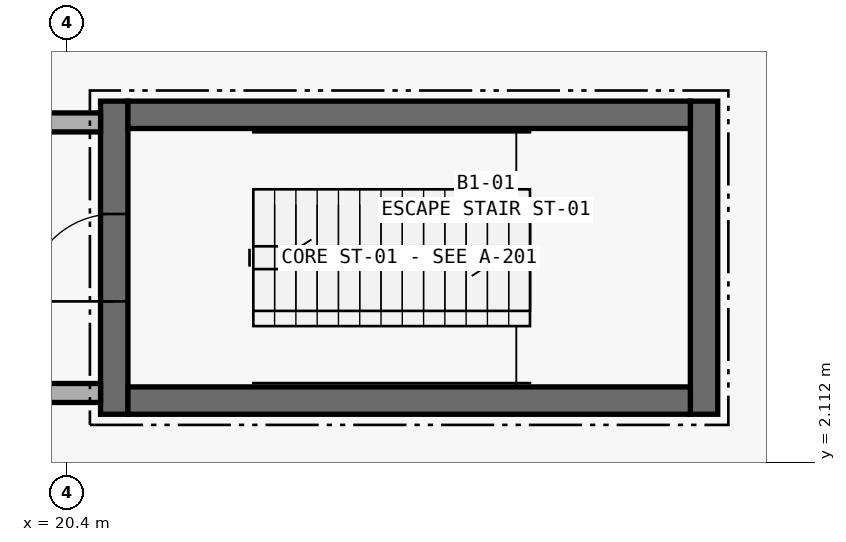
"""IFC4 building model, lengths in metres.
Left out: names, types, materials, properties, quantities, classifications, styles, units other than length and angle.
Written with IfcOpenShell. Run it as: python <this file> out.ifc"""

import sys

from ifc_helpers import new_model, si_unit, direction, frame, frame_2d, origin, place, context, subcontext, project, spatial, rectangle, extrude, element, fill, save


model = new_model("IFC4")
c1 = context("Model", 3, precision=1e-05, world=origin(), true_north=direction((0.0, 1.0)))
c2 = subcontext(c1, "Body", "Model", "MODEL_VIEW")
j1 = project(units=[si_unit("LENGTHUNIT", "METRE"), si_unit("PLANEANGLEUNIT", "RADIAN")], contexts=[c1])
p1 = place(None, origin())
s1 = spatial("IfcSite", under=j1, at=p1, CompositionType="ELEMENT")
p2 = place(p1, origin())
s2 = spatial("IfcBuilding", under=s1, at=p2, CompositionType="ELEMENT")
p3 = place(p2, frame((0.0, 0.0, -4.8)))
s3 = spatial("IfcBuildingStorey", under=s2, at=p3, CompositionType="ELEMENT", Elevation=-4.8)
p4 = place(p3, frame((21.02, 2.74, 0.0), z_axis=(0.0, 0.0, 1.0), x_axis=(0.0, 1.0, 0.0)))
e1 = element("IfcWall", 1, at=p4, inside=s3, PredefinedType="SHEAR", context=c2, shape_type="SweptSolid", body=[
    extrude(rectangle(XDim=4.12, YDim=0.36, at=frame_2d((2.06, 0.0))), origin(), (0.0, 0.0, 1.0), 4.38),
])
p5 = place(p4, frame((1.485, 0.0, 0.0)))
e2 = element("IfcOpeningElement", 2, at=p5, cuts=e1, PredefinedType="OPENING", context=c2, shape_type="SweptSolid", body=[
    extrude(rectangle(XDim=1.15, YDim=2.15, at=frame_2d((0.575, 1.075))), frame((0.0, 0.195, 0.0), z_axis=(0.0, -1.0, 0.0), x_axis=(1.0, 0.0, 0.0)), (0.0, 0.0, 1.0), 0.39),
])
p6 = place(p3, frame((28.78, 2.74, 0.0), z_axis=(0.0, 0.0, 1.0), x_axis=(0.0, 1.0, 0.0)))
e3 = element("IfcWall", 3, at=p6, inside=s3, PredefinedType="SHEAR", context=c2, shape_type="SweptSolid", body=[
    extrude(rectangle(XDim=4.12, YDim=0.36, at=frame_2d((2.06, 0.0))), origin(), (0.0, 0.0, 1.0), 4.38),
])
for number, where, z_axis, x_axis in (
    (4, (21.2, 6.68, 0.0), (0.0, 0.0, 1.0), (1.0, 0.0, 0.0)),
    (5, (21.2, 2.92, 0.0), (0.0, 0.0, 1.0), (1.0, 0.0, 0.0)),
):
    element("IfcWall", number, at=place(p3, frame(where, z_axis=z_axis, x_axis=x_axis)), inside=s3, PredefinedType="SHEAR", context=c2, shape_type="SweptSolid", body=[
        extrude(rectangle(XDim=7.4, YDim=0.36, at=frame_2d((3.7, 0.0))), origin(), (0.0, 0.0, 1.0), 4.38),
    ])
p7 = place(p3, frame((16.795, 3.02, 0.0), z_axis=(0.0, 0.0, 1.0), x_axis=(1.0, 0.0, 0.0)))
e6 = element("IfcWall", 6, at=p7, inside=s3, PredefinedType="PARTITIONING", context=c2, shape_type="SweptSolid", body=[
    extrude(rectangle(XDim=4.045, YDim=0.25, at=frame_2d((2.022, 0.0))), origin(), (0.0, 0.0, 1.0), 3.26),
])
p8 = place(p3, frame((19.655, 6.58, 0.0), z_axis=(0.0, 0.0, 1.0), x_axis=(1.0, 0.0, 0.0)))
e7 = element("IfcWall", 7, at=p8, inside=s3, PredefinedType="PARTITIONING", context=c2, shape_type="SweptSolid", body=[
    extrude(rectangle(XDim=1.185, YDim=0.25, at=frame_2d((0.593, 0.0))), origin(), (0.0, 0.0, 1.0), 3.26),
])
p9 = place(p5, origin())
e8 = element("IfcDoor", 8, at=p9, inside=s3, OperationType="SINGLE_SWING_LEFT", PredefinedType="DOOR", context=c2, shape_type="SweptSolid", body=[
    extrude(rectangle(XDim=1.15, YDim=2.15, at=frame_2d((0.575, 1.075))), frame((0.0, 0.025, 0.0), z_axis=(0.0, -1.0, 0.0), x_axis=(1.0, 0.0, 0.0)), (0.0, 0.0, 1.0), 0.05),
])
fill(e2, e8)
save(model, sys.argv[1])
